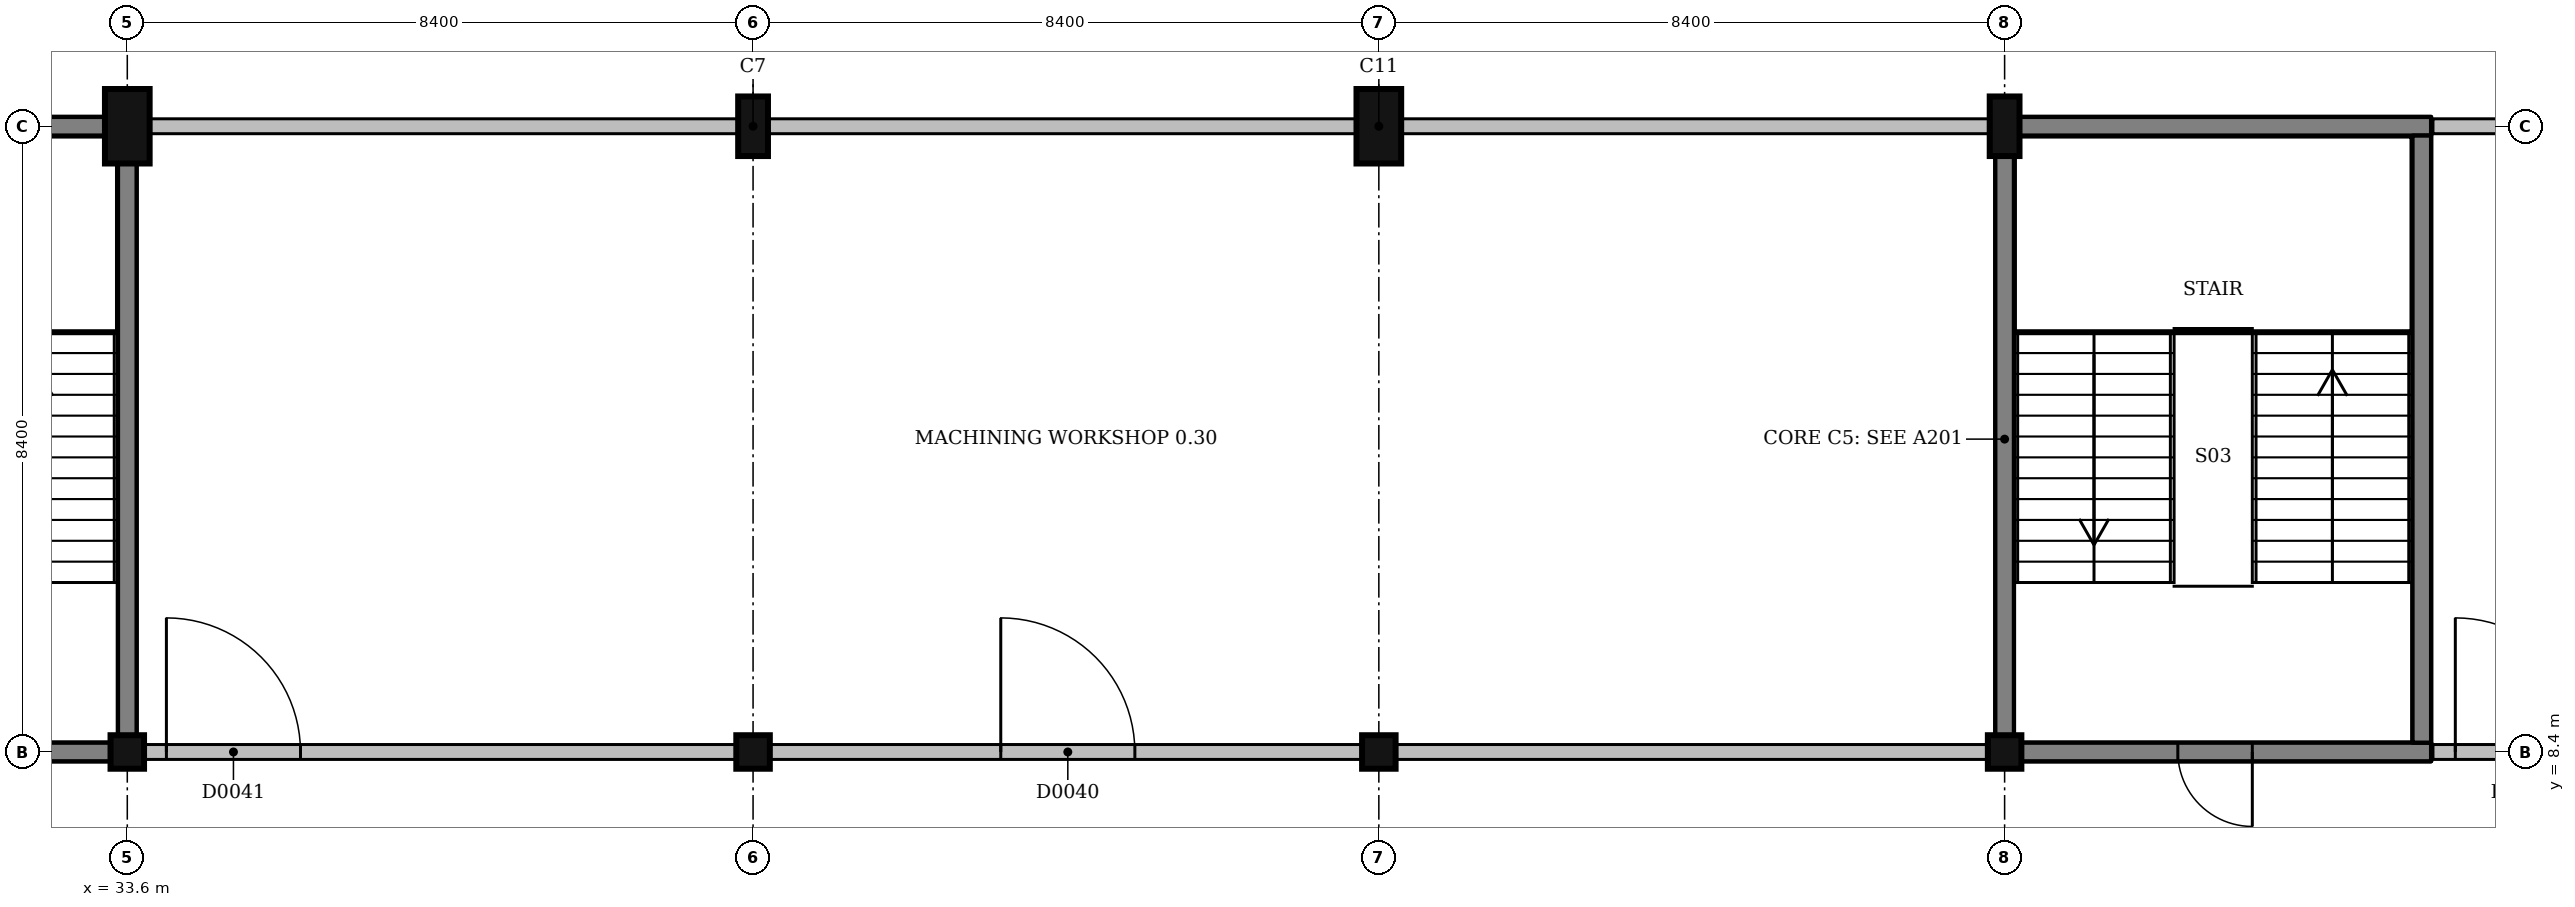
"""IFC4 building model, lengths in metres.
Left out: names, types, materials, properties, quantities, classifications, styles, units other than length and angle.
Written with IfcOpenShell. Run it as: python <this file> out.ifc"""

import sys

from ifc_helpers import new_model, si_unit, direction, frame, frame_2d, origin, origin_2d, place, context, subcontext, project, spatial, rectangle, extrude, element, fill, save


model = new_model("IFC4")
c1 = context("Model", 3, precision=1e-05, world=origin(), true_north=direction((0.0, 1.0)))
c2 = subcontext(c1, "Body", "Model", "MODEL_VIEW")
j1 = project(units=[si_unit("LENGTHUNIT", "METRE"), si_unit("PLANEANGLEUNIT", "RADIAN")], contexts=[c1])
p1 = place(None, origin())
s1 = spatial("IfcSite", under=j1, at=p1, CompositionType="ELEMENT")
p2 = place(p1, origin())
s2 = spatial("IfcBuilding", under=s1, at=p2, CompositionType="ELEMENT")
p3 = place(p2, origin())
s3 = spatial("IfcBuildingStorey", under=s2, at=p3, CompositionType="ELEMENT", Elevation=0.0)
p4 = place(p3, frame((33.6, 8.4, -1.5), z_axis=(0.0, 0.0, 1.0), x_axis=(1.0, 0.0, 0.0)))
e1 = element("IfcColumn", 1, at=p4, inside=s3, PredefinedType="COLUMN", context=c2, shape_type="SweptSolid", body=[
    extrude(rectangle(XDim=0.45, YDim=0.45, at=origin_2d()), origin(), (0.0, 0.0, 1.0), 6.0),
])
p5 = place(p3, frame((33.6, 16.8, -1.5), z_axis=(0.0, 0.0, 1.0), x_axis=(1.0, 0.0, 0.0)))
e2 = element("IfcColumn", 2, at=p5, inside=s3, PredefinedType="COLUMN", context=c2, shape_type="SweptSolid", body=[
    extrude(rectangle(XDim=0.6, YDim=1.0, at=origin_2d()), origin(), (0.0, 0.0, 1.0), 6.0),
])
p6 = place(p3, frame((42.0, 8.4, -1.5), z_axis=(0.0, 0.0, 1.0), x_axis=(1.0, 0.0, 0.0)))
e3 = element("IfcColumn", 3, at=p6, inside=s3, PredefinedType="COLUMN", context=c2, shape_type="SweptSolid", body=[
    extrude(rectangle(XDim=0.45, YDim=0.45, at=origin_2d()), origin(), (0.0, 0.0, 1.0), 6.0),
])
p7 = place(p3, frame((42.0, 16.8, -1.5), z_axis=(0.0, 0.0, 1.0), x_axis=(1.0, 0.0, 0.0)))
e4 = element("IfcColumn", 4, at=p7, inside=s3, PredefinedType="COLUMN", context=c2, shape_type="SweptSolid", body=[
    extrude(rectangle(XDim=0.4, YDim=0.8, at=origin_2d()), origin(), (0.0, 0.0, 1.0), 6.0),
])
p8 = place(p3, frame((50.4, 8.4, -1.5), z_axis=(0.0, 0.0, 1.0), x_axis=(1.0, 0.0, 0.0)))
e5 = element("IfcColumn", 5, at=p8, inside=s3, PredefinedType="COLUMN", context=c2, shape_type="SweptSolid", body=[
    extrude(rectangle(XDim=0.45, YDim=0.45, at=origin_2d()), origin(), (0.0, 0.0, 1.0), 6.0),
])
p9 = place(p3, frame((50.4, 16.8, -1.5), z_axis=(0.0, 0.0, 1.0), x_axis=(1.0, 0.0, 0.0)))
e6 = element("IfcColumn", 6, at=p9, inside=s3, PredefinedType="COLUMN", context=c2, shape_type="SweptSolid", body=[
    extrude(rectangle(XDim=0.6, YDim=1.0, at=origin_2d()), origin(), (0.0, 0.0, 1.0), 6.0),
])
p10 = place(p3, frame((58.8, 8.4, -1.5), z_axis=(0.0, 0.0, 1.0), x_axis=(1.0, 0.0, 0.0)))
e7 = element("IfcColumn", 7, at=p10, inside=s3, PredefinedType="COLUMN", context=c2, shape_type="SweptSolid", body=[
    extrude(rectangle(XDim=0.45, YDim=0.45, at=origin_2d()), origin(), (0.0, 0.0, 1.0), 6.0),
])
p11 = place(p3, frame((58.8, 16.8, -1.5), z_axis=(0.0, 0.0, 1.0), x_axis=(1.0, 0.0, 0.0)))
e8 = element("IfcColumn", 8, at=p11, inside=s3, PredefinedType="COLUMN", context=c2, shape_type="SweptSolid", body=[
    extrude(rectangle(XDim=0.4, YDim=0.8, at=origin_2d()), origin(), (0.0, 0.0, 1.0), 6.0),
])
p12 = place(p3, frame((27.875, 8.4, 0.0), z_axis=(0.0, 0.0, 1.0), x_axis=(1.0, 0.0, 0.0)))
e9 = element("IfcWall", 9, at=p12, inside=s3, PredefinedType="SHEAR", context=c2, shape_type="SweptSolid", body=[
    extrude(rectangle(XDim=5.5, YDim=0.25, at=frame_2d((2.75, 0.0))), origin(), (0.0, 0.0, 1.0), 4.5),
])
p13 = place(p12, frame((2.45, 0.0, 0.0)))
e10 = element("IfcOpeningElement", 10, at=p13, cuts=e9, PredefinedType="OPENING", context=c2, shape_type="SweptSolid", body=[
    extrude(rectangle(XDim=1.0, YDim=2.1, at=frame_2d((0.5, 1.05))), frame((0.0, 0.135, 0.0), z_axis=(0.0, -1.0, 0.0), x_axis=(1.0, 0.0, 0.0)), (0.0, 0.0, 1.0), 0.27),
])
p14 = place(p3, frame((27.875, 16.8, 0.0), z_axis=(0.0, 0.0, 1.0), x_axis=(1.0, 0.0, 0.0)))
e11 = element("IfcWall", 11, at=p14, inside=s3, PredefinedType="SHEAR", context=c2, shape_type="SweptSolid", body=[
    extrude(rectangle(XDim=5.425, YDim=0.25, at=frame_2d((2.712, 0.0))), origin(), (0.0, 0.0, 1.0), 4.5),
])
p15 = place(p3, frame((33.6, 8.625, 0.0), z_axis=(0.0, 0.0, 1.0), x_axis=(0.0, 1.0, 0.0)))
e12 = element("IfcWall", 12, at=p15, inside=s3, PredefinedType="SHEAR", context=c2, shape_type="SweptSolid", body=[
    extrude(rectangle(XDim=7.675, YDim=0.25, at=frame_2d((3.837, 0.0))), origin(), (0.0, 0.0, 1.0), 4.5),
])
p16 = place(p3, frame((59.025, 8.4, 0.0), z_axis=(0.0, 0.0, 1.0), x_axis=(1.0, 0.0, 0.0)))
e13 = element("IfcWall", 13, at=p16, inside=s3, PredefinedType="SHEAR", context=c2, shape_type="SweptSolid", body=[
    extrude(rectangle(XDim=5.5, YDim=0.25, at=frame_2d((2.75, 0.0))), origin(), (0.0, 0.0, 1.0), 4.5),
])
p17 = place(p16, frame((2.1, 0.0, 0.0)))
e14 = element("IfcOpeningElement", 14, at=p17, cuts=e13, PredefinedType="OPENING", context=c2, shape_type="SweptSolid", body=[
    extrude(rectangle(XDim=1.0, YDim=2.1, at=frame_2d((0.5, 1.05))), frame((0.0, 0.135, 0.0), z_axis=(0.0, -1.0, 0.0), x_axis=(1.0, 0.0, 0.0)), (0.0, 0.0, 1.0), 0.27),
])
p18 = place(p3, frame((59.0, 16.8, 0.0), z_axis=(0.0, 0.0, 1.0), x_axis=(1.0, 0.0, 0.0)))
e15 = element("IfcWall", 15, at=p18, inside=s3, PredefinedType="SHEAR", context=c2, shape_type="SweptSolid", body=[
    extrude(rectangle(XDim=5.525, YDim=0.25, at=frame_2d((2.762, 0.0))), origin(), (0.0, 0.0, 1.0), 4.5),
])
p19 = place(p3, frame((58.8, 8.625, 0.0), z_axis=(0.0, 0.0, 1.0), x_axis=(0.0, 1.0, 0.0)))
e16 = element("IfcWall", 16, at=p19, inside=s3, PredefinedType="SHEAR", context=c2, shape_type="SweptSolid", body=[
    extrude(rectangle(XDim=7.775, YDim=0.25, at=frame_2d((3.887, 0.0))), origin(), (0.0, 0.0, 1.0), 4.5),
])
p20 = place(p3, frame((64.4, 8.525, 0.0), z_axis=(0.0, 0.0, 1.0), x_axis=(0.0, 1.0, 0.0)))
e17 = element("IfcWall", 17, at=p20, inside=s3, PredefinedType="SHEAR", context=c2, shape_type="SweptSolid", body=[
    extrude(rectangle(XDim=8.15, YDim=0.25, at=frame_2d((4.075, 0.0))), origin(), (0.0, 0.0, 1.0), 4.5),
])
for number, where, z_axis, x_axis in (
    (18, (27.875, 8.4, -1.5), (0.0, 0.0, 1.0), (1.0, 0.0, 0.0)),
    (19, (27.875, 16.8, -1.5), (0.0, 0.0, 1.0), (1.0, 0.0, 0.0)),
):
    element("IfcWall", number, at=place(p3, frame(where, z_axis=z_axis, x_axis=x_axis)), inside=s3, PredefinedType="SHEAR", context=c2, shape_type="SweptSolid", body=[
        extrude(rectangle(XDim=5.85, YDim=0.25, at=frame_2d((2.925, 0.0))), origin(), (0.0, 0.0, 1.0), 1.5),
    ])
p21 = place(p3, frame((33.6, 8.525, -1.5), z_axis=(0.0, 0.0, 1.0), x_axis=(0.0, 1.0, 0.0)))
e20 = element("IfcWall", 20, at=p21, inside=s3, PredefinedType="SHEAR", context=c2, shape_type="SweptSolid", body=[
    extrude(rectangle(XDim=8.15, YDim=0.25, at=frame_2d((4.075, 0.0))), origin(), (0.0, 0.0, 1.0), 1.5),
])
for number, where, z_axis, x_axis in (
    (21, (58.675, 8.4, -1.5), (0.0, 0.0, 1.0), (1.0, 0.0, 0.0)),
    (22, (58.675, 16.8, -1.5), (0.0, 0.0, 1.0), (1.0, 0.0, 0.0)),
):
    element("IfcWall", number, at=place(p3, frame(where, z_axis=z_axis, x_axis=x_axis)), inside=s3, PredefinedType="SHEAR", context=c2, shape_type="SweptSolid", body=[
        extrude(rectangle(XDim=5.85, YDim=0.25, at=frame_2d((2.925, 0.0))), origin(), (0.0, 0.0, 1.0), 1.5),
    ])
for number, where, z_axis, x_axis in (
    (23, (58.8, 8.525, -1.5), (0.0, 0.0, 1.0), (0.0, 1.0, 0.0)),
    (24, (64.4, 8.525, -1.5), (0.0, 0.0, 1.0), (0.0, 1.0, 0.0)),
):
    element("IfcWall", number, at=place(p3, frame(where, z_axis=z_axis, x_axis=x_axis)), inside=s3, PredefinedType="SHEAR", context=c2, shape_type="SweptSolid", body=[
        extrude(rectangle(XDim=8.15, YDim=0.25, at=frame_2d((4.075, 0.0))), origin(), (0.0, 0.0, 1.0), 1.5),
    ])
p22 = place(p3, frame((33.825, 8.4, 0.0), z_axis=(0.0, 0.0, 1.0), x_axis=(1.0, 0.0, 0.0)))
e25 = element("IfcWall", 25, at=p22, inside=s3, PredefinedType="PARTITIONING", context=c2, shape_type="SweptSolid", body=[
    extrude(rectangle(XDim=7.95, YDim=0.2, at=frame_2d((3.975, 0.0))), origin(), (0.0, 0.0, 1.0), 3.5),
])
p23 = place(p22, frame((0.3, 0.0, 0.0)))
e26 = element("IfcOpeningElement", 26, at=p23, cuts=e25, PredefinedType="OPENING", context=c2, shape_type="SweptSolid", body=[
    extrude(rectangle(XDim=1.8, YDim=2.1, at=frame_2d((0.9, 1.05))), frame((0.0, 0.11, 0.0), z_axis=(0.0, -1.0, 0.0), x_axis=(1.0, 0.0, 0.0)), (0.0, 0.0, 1.0), 0.22),
])
p24 = place(p3, frame((42.225, 8.4, 0.0), z_axis=(0.0, 0.0, 1.0), x_axis=(1.0, 0.0, 0.0)))
e27 = element("IfcWall", 27, at=p24, inside=s3, PredefinedType="PARTITIONING", context=c2, shape_type="SweptSolid", body=[
    extrude(rectangle(XDim=7.95, YDim=0.2, at=frame_2d((3.975, 0.0))), origin(), (0.0, 0.0, 1.0), 3.5),
])
p25 = place(p24, frame((3.1, 0.0, 0.0)))
e28 = element("IfcOpeningElement", 28, at=p25, cuts=e27, PredefinedType="OPENING", context=c2, shape_type="SweptSolid", body=[
    extrude(rectangle(XDim=1.8, YDim=2.1, at=frame_2d((0.9, 1.05))), frame((0.0, 0.11, 0.0), z_axis=(0.0, -1.0, 0.0), x_axis=(1.0, 0.0, 0.0)), (0.0, 0.0, 1.0), 0.22),
])
p26 = place(p3, frame((50.625, 8.4, 0.0), z_axis=(0.0, 0.0, 1.0), x_axis=(1.0, 0.0, 0.0)))
e29 = element("IfcWall", 29, at=p26, inside=s3, PredefinedType="PARTITIONING", context=c2, shape_type="SweptSolid", body=[
    extrude(rectangle(XDim=7.95, YDim=0.2, at=frame_2d((3.975, 0.0))), origin(), (0.0, 0.0, 1.0), 3.5),
])
p27 = place(p3, frame((64.55, 8.4, 0.0), z_axis=(0.0, 0.0, 1.0), x_axis=(1.0, 0.0, 0.0)))
e30 = element("IfcWall", 30, at=p27, inside=s3, PredefinedType="PARTITIONING", context=c2, shape_type="SweptSolid", body=[
    extrude(rectangle(XDim=2.425, YDim=0.2, at=frame_2d((1.212, 0.0))), origin(), (0.0, 0.0, 1.0), 3.6),
])
p28 = place(p27, frame((0.3, 0.0, 0.0)))
e31 = element("IfcOpeningElement", 31, at=p28, cuts=e30, PredefinedType="OPENING", context=c2, shape_type="SweptSolid", body=[
    extrude(rectangle(XDim=1.8, YDim=2.1, at=frame_2d((0.9, 1.05))), frame((0.0, 0.11, 0.0), z_axis=(0.0, -1.0, 0.0), x_axis=(1.0, 0.0, 0.0)), (0.0, 0.0, 1.0), 0.22),
])
for number, where, z_axis, x_axis in (
    (32, (33.9, 16.8, 0.0), (0.0, 0.0, 1.0), (1.0, 0.0, 0.0)),
    (33, (42.2, 16.8, 0.0), (0.0, 0.0, 1.0), (1.0, 0.0, 0.0)),
    (34, (50.7, 16.8, 0.0), (0.0, 0.0, 1.0), (1.0, 0.0, 0.0)),
):
    element("IfcWall", number, at=place(p3, frame(where, z_axis=z_axis, x_axis=x_axis)), inside=s3, PredefinedType="PARTITIONING", context=c2, shape_type="SweptSolid", body=[
        extrude(rectangle(XDim=7.9, YDim=0.2, at=frame_2d((3.95, 0.0))), origin(), (0.0, 0.0, 1.0), 3.45),
    ])
p29 = place(p3, frame((64.55, 16.8, 0.0), z_axis=(0.0, 0.0, 1.0), x_axis=(1.0, 0.0, 0.0)))
e35 = element("IfcWall", 35, at=p29, inside=s3, PredefinedType="PARTITIONING", context=c2, shape_type="SweptSolid", body=[
    extrude(rectangle(XDim=2.35, YDim=0.2, at=frame_2d((1.175, 0.0))), origin(), (0.0, 0.0, 1.0), 3.45),
])
p30 = place(p25, origin())
e36 = element("IfcDoor", 36, at=p30, inside=s3, OperationType="DOUBLE_DOOR_SINGLE_SWING", PredefinedType="DOOR", context=c2, shape_type="SweptSolid", body=[
    extrude(rectangle(XDim=1.8, YDim=2.1, at=frame_2d((0.9, 1.05))), frame((0.0, 0.025, 0.0), z_axis=(0.0, -1.0, 0.0), x_axis=(1.0, 0.0, 0.0)), (0.0, 0.0, 1.0), 0.05),
])
fill(e28, e36)
p31 = place(p23, origin())
e37 = element("IfcDoor", 37, at=p31, inside=s3, OperationType="DOUBLE_DOOR_SINGLE_SWING", PredefinedType="DOOR", context=c2, shape_type="SweptSolid", body=[
    extrude(rectangle(XDim=1.8, YDim=2.1, at=frame_2d((0.9, 1.05))), frame((0.0, 0.025, 0.0), z_axis=(0.0, -1.0, 0.0), x_axis=(1.0, 0.0, 0.0)), (0.0, 0.0, 1.0), 0.05),
])
fill(e26, e37)
p32 = place(p28, origin())
e38 = element("IfcDoor", 38, at=p32, inside=s3, OperationType="DOUBLE_DOOR_SINGLE_SWING", PredefinedType="DOOR", context=c2, shape_type="SweptSolid", body=[
    extrude(rectangle(XDim=1.8, YDim=2.1, at=frame_2d((0.9, 1.05))), frame((0.0, 0.025, 0.0), z_axis=(0.0, -1.0, 0.0), x_axis=(1.0, 0.0, 0.0)), (0.0, 0.0, 1.0), 0.05),
])
fill(e31, e38)
p33 = place(p17, origin())
e39 = element("IfcDoor", 39, at=p33, inside=s3, OperationType="SINGLE_SWING_RIGHT", PredefinedType="DOOR", context=c2, shape_type="SweptSolid", body=[
    extrude(rectangle(XDim=1.0, YDim=2.1, at=frame_2d((0.5, 1.05))), frame((0.0, 0.025, 0.0), z_axis=(0.0, -1.0, 0.0), x_axis=(1.0, 0.0, 0.0)), (0.0, 0.0, 1.0), 0.05),
])
fill(e14, e39)
save(model, sys.argv[1])
